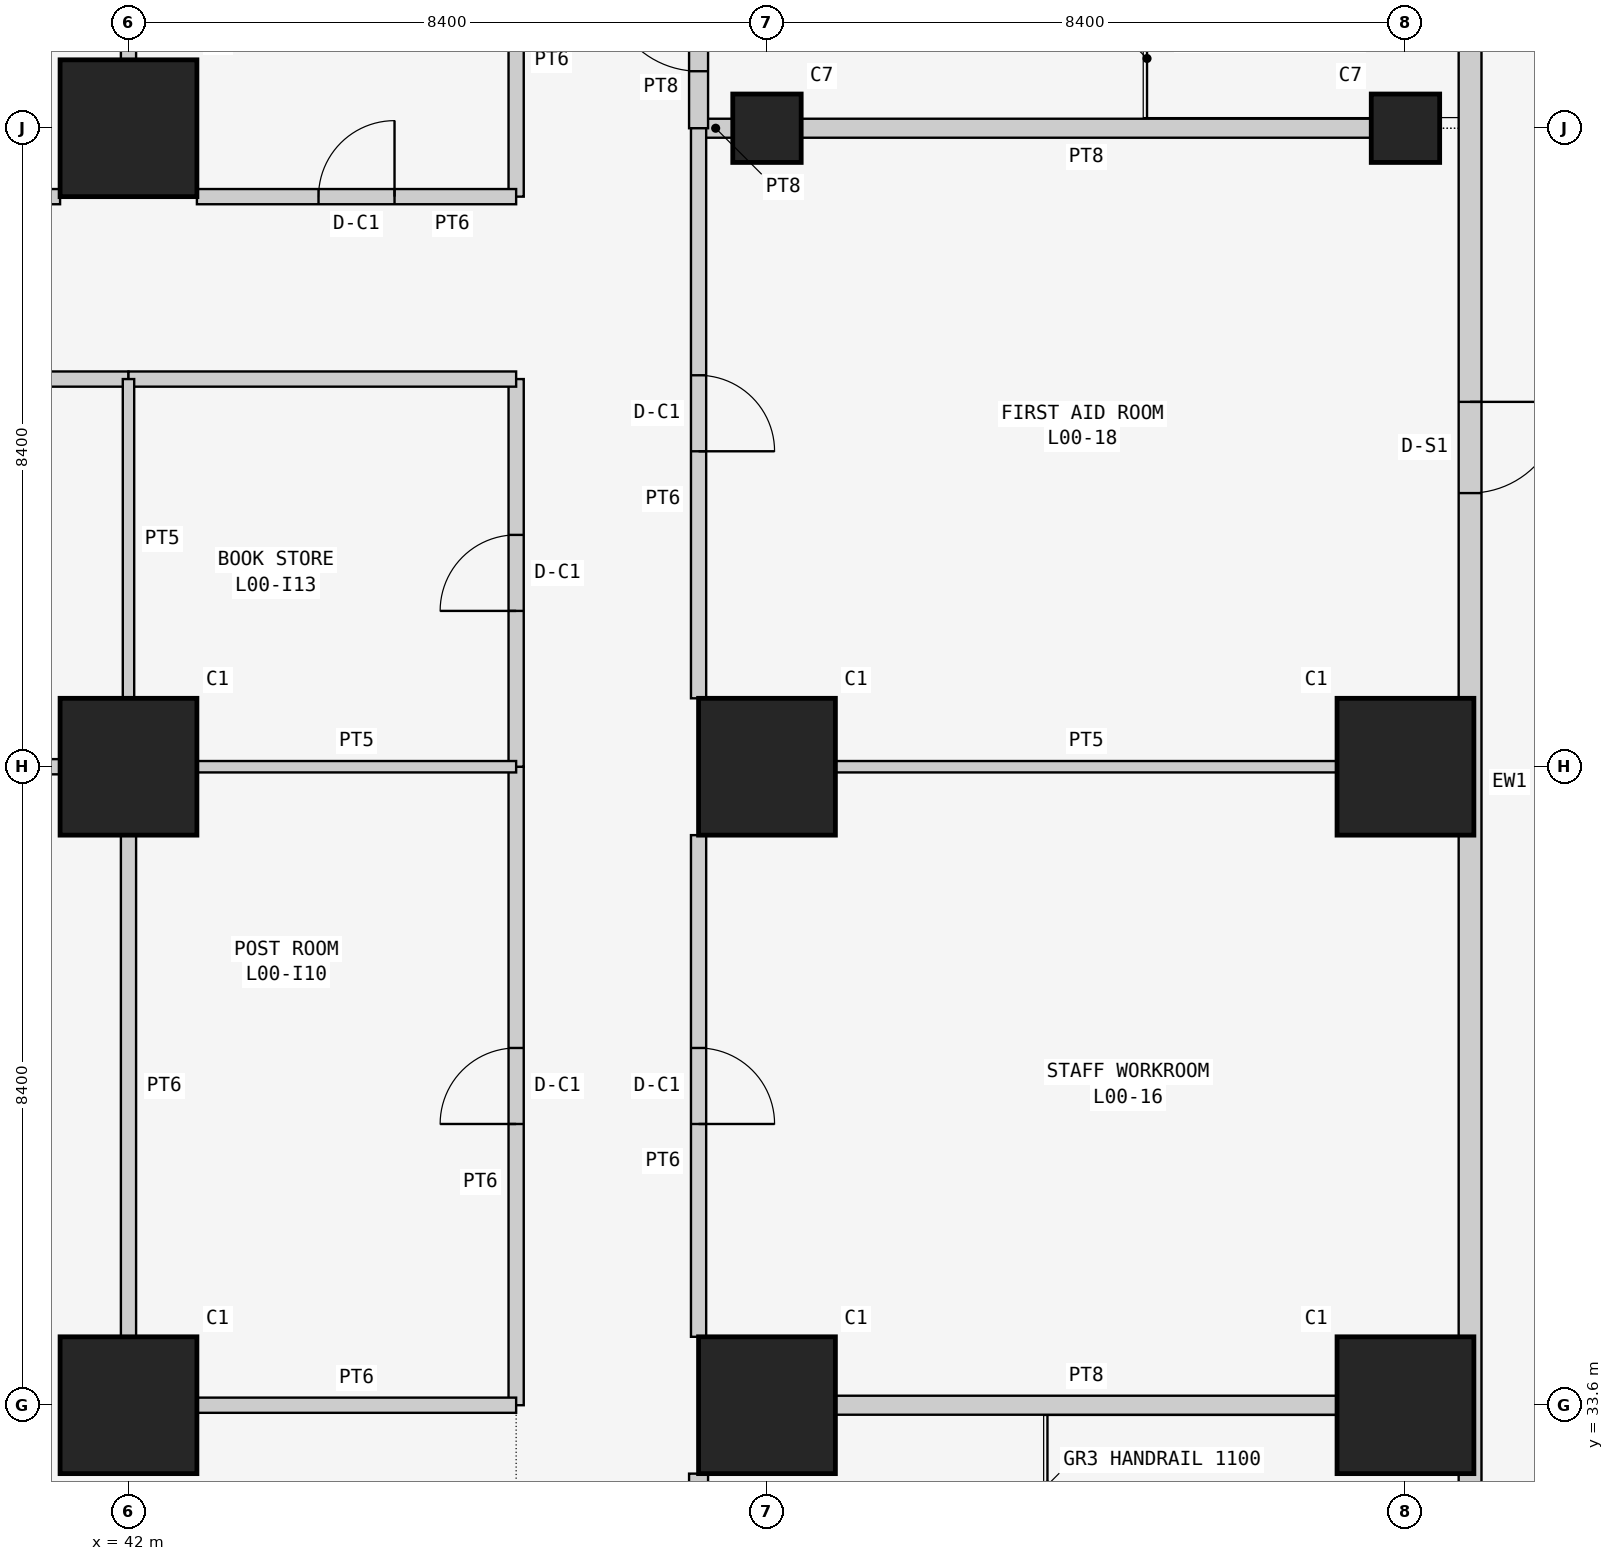
"""IFC4 building model, lengths in metres.
Left out: names, types, materials, properties, quantities, classifications, styles, units other than length and angle.
Written with IfcOpenShell. Run it as: python <this file> out.ifc"""

import sys

from ifc_helpers import new_model, si_unit, direction, frame, frame_2d, origin, origin_2d, place, context, subcontext, project, spatial, rectangle, extrude, element, fill, save


model = new_model("IFC4")
c1 = context("Model", 3, precision=1e-05, world=origin(), true_north=direction((0.0, 1.0)))
c2 = subcontext(c1, "Body", "Model", "MODEL_VIEW")
j1 = project(units=[si_unit("LENGTHUNIT", "METRE"), si_unit("PLANEANGLEUNIT", "RADIAN")], contexts=[c1])
p1 = place(None, origin())
s1 = spatial("IfcSite", under=j1, at=p1, CompositionType="ELEMENT")
p2 = place(p1, origin())
s2 = spatial("IfcBuilding", under=s1, at=p2, CompositionType="ELEMENT")
p3 = place(p2, origin())
s3 = spatial("IfcBuildingStorey", under=s2, at=p3, CompositionType="ELEMENT", Elevation=0.0)
for number, where, z_axis, x_axis in (
    (1, (42.0, 33.6, 0.0), (0.0, 0.0, 1.0), (1.0, 0.0, 0.0)),
    (2, (42.0, 42.0, 0.0), (0.0, 0.0, 1.0), (1.0, 0.0, 0.0)),
    (3, (42.0, 50.4, 0.0), (0.0, 0.0, 1.0), (1.0, 0.0, 0.0)),
    (4, (50.4, 33.6, 0.0), (0.0, 0.0, 1.0), (1.0, 0.0, 0.0)),
    (5, (50.4, 42.0, 0.0), (0.0, 0.0, 1.0), (1.0, 0.0, 0.0)),
):
    element("IfcColumn", number, at=place(p3, frame(where, z_axis=z_axis, x_axis=x_axis)), inside=s3, PredefinedType="COLUMN", context=c2, shape_type="SweptSolid", body=[
        extrude(rectangle(XDim=1.8, YDim=1.8, at=origin_2d()), origin(), (0.0, 0.0, 1.0), 6.0),
    ])
p4 = place(p3, frame((50.4, 50.4, 0.0), z_axis=(0.0, 0.0, 1.0), x_axis=(1.0, 0.0, 0.0)))
e6 = element("IfcColumn", 6, at=p4, inside=s3, PredefinedType="COLUMN", context=c2, shape_type="SweptSolid", body=[
    extrude(rectangle(XDim=0.9, YDim=0.9, at=origin_2d()), origin(), (0.0, 0.0, 1.0), 6.0),
])
for number, where, z_axis, x_axis in (
    (7, (58.8, 33.6, 0.0), (0.0, 0.0, 1.0), (1.0, 0.0, 0.0)),
    (8, (58.8, 42.0, 0.0), (0.0, 0.0, 1.0), (1.0, 0.0, 0.0)),
):
    element("IfcColumn", number, at=place(p3, frame(where, z_axis=z_axis, x_axis=x_axis)), inside=s3, PredefinedType="COLUMN", context=c2, shape_type="SweptSolid", body=[
        extrude(rectangle(XDim=1.8, YDim=1.8, at=origin_2d()), origin(), (0.0, 0.0, 1.0), 6.0),
    ])
p5 = place(p3, frame((58.8, 50.4, 0.0), z_axis=(0.0, 0.0, 1.0), x_axis=(1.0, 0.0, 0.0)))
e9 = element("IfcColumn", 9, at=p5, inside=s3, PredefinedType="COLUMN", context=c2, shape_type="SweptSolid", body=[
    extrude(rectangle(XDim=0.9, YDim=0.9, at=origin_2d()), origin(), (0.0, 0.0, 1.0), 6.0),
])
p6 = place(p3, frame((59.65, 25.2, 0.0), z_axis=(0.0, 0.0, 1.0), x_axis=(0.0, 1.0, 0.0)))
e10 = element("IfcWall", 10, at=p6, inside=s3, PredefinedType="SOLIDWALL", context=c2, shape_type="SweptSolid", body=[
    extrude(rectangle(XDim=33.2, YDim=0.3, at=frame_2d((16.6, 0.0))), origin(), (0.0, 0.0, 1.0), 5.8),
])
p7 = place(p6, frame((3.0, 0.0, 0.0)))
e11 = element("IfcOpeningElement", 11, at=p7, cuts=e10, PredefinedType="OPENING", context=c2, shape_type="SweptSolid", body=[
    extrude(rectangle(XDim=1.2, YDim=2.4, at=frame_2d((0.6, 1.2))), frame((0.0, 0.16, 0.0), z_axis=(0.0, -1.0, 0.0), x_axis=(1.0, 0.0, 0.0)), (0.0, 0.0, 1.0), 0.32),
])
p8 = place(p6, frame((20.4, 0.0, 0.0)))
e12 = element("IfcOpeningElement", 12, at=p8, cuts=e10, PredefinedType="OPENING", context=c2, shape_type="SweptSolid", body=[
    extrude(rectangle(XDim=1.2, YDim=2.4, at=frame_2d((0.6, 1.2))), frame((0.0, 0.16, 0.0), z_axis=(0.0, -1.0, 0.0), x_axis=(1.0, 0.0, 0.0)), (0.0, 0.0, 1.0), 0.32),
])
p9 = place(p6, frame((30.2, 0.0, 0.0)))
e13 = element("IfcOpeningElement", 13, at=p9, cuts=e10, PredefinedType="OPENING", context=c2, shape_type="SweptSolid", body=[
    extrude(rectangle(XDim=1.8, YDim=2.4, at=frame_2d((0.9, 1.2))), frame((0.0, 0.16, 0.0), z_axis=(0.0, -1.0, 0.0), x_axis=(1.0, 0.0, 0.0)), (0.0, 0.0, 1.0), 0.32),
])
p10 = place(p3, frame((51.3, 33.6, 0.0), z_axis=(0.0, 0.0, 1.0), x_axis=(1.0, 0.0, 0.0)))
e14 = element("IfcWall", 14, at=p10, inside=s3, PredefinedType="SOLIDWALL", context=c2, shape_type="SweptSolid", body=[
    extrude(rectangle(XDim=6.6, YDim=0.25, at=frame_2d((3.3, 0.0))), origin(), (0.0, 0.0, 1.0), 5.043),
])
p11 = place(p3, frame((49.5, 26.1, 0.0), z_axis=(0.0, 0.0, 1.0), x_axis=(0.0, 1.0, 0.0)))
e15 = element("IfcWall", 15, at=p11, inside=s3, PredefinedType="SOLIDWALL", context=c2, shape_type="SweptSolid", body=[
    extrude(rectangle(XDim=6.6, YDim=0.25, at=frame_2d((3.3, 0.0))), origin(), (0.0, 0.0, 1.0), 5.8),
])
p12 = place(p11, frame((2.0, 0.0, 0.0)))
e16 = element("IfcOpeningElement", 16, at=p12, cuts=e15, PredefinedType="OPENING", context=c2, shape_type="SweptSolid", body=[
    extrude(rectangle(XDim=2.6, YDim=2.4, at=frame_2d((1.3, 1.2))), frame((0.0, 0.135, 0.0), z_axis=(0.0, -1.0, 0.0), x_axis=(1.0, 0.0, 0.0)), (0.0, 0.0, 1.0), 0.27),
])
p13 = place(p3, frame((49.95, 50.4, 0.0), z_axis=(0.0, 0.0, 1.0), x_axis=(-1.0, 0.0, 0.0)))
e17 = element("IfcWall", 17, at=p13, inside=s3, PredefinedType="SOLIDWALL", context=c2, shape_type="SweptSolid", body=[
    extrude(rectangle(XDim=0.45, YDim=0.25, at=frame_2d((0.225, 0.0))), origin(), (0.0, 0.0, 1.0), 5.043),
])
p14 = place(p3, frame((58.35, 50.4, 0.0), z_axis=(0.0, 0.0, 1.0), x_axis=(-1.0, 0.0, 0.0)))
e18 = element("IfcWall", 18, at=p14, inside=s3, PredefinedType="SOLIDWALL", context=c2, shape_type="SweptSolid", body=[
    extrude(rectangle(XDim=7.5, YDim=0.25, at=frame_2d((3.75, 0.0))), origin(), (0.0, 0.0, 1.0), 5.043),
])
p15 = place(p3, frame((49.5, 50.4, 0.0), z_axis=(0.0, 0.0, 1.0), x_axis=(0.0, 1.0, 0.0)))
e19 = element("IfcWall", 19, at=p15, inside=s3, PredefinedType="SOLIDWALL", context=c2, shape_type="SweptSolid", body=[
    extrude(rectangle(XDim=2.7, YDim=0.25, at=frame_2d((1.35, 0.0))), origin(), (0.0, 0.0, 1.0), 5.8),
])
p16 = place(p15, frame((0.75, 0.0, 0.0)))
e20 = element("IfcOpeningElement", 20, at=p16, cuts=e19, PredefinedType="OPENING", context=c2, shape_type="SweptSolid", body=[
    extrude(rectangle(XDim=1.2, YDim=2.1, at=frame_2d((0.6, 1.05))), frame((0.0, 0.135, 0.0), z_axis=(0.0, -1.0, 0.0), x_axis=(1.0, 0.0, 0.0)), (0.0, 0.0, 1.0), 0.27),
])
p17 = place(p3, frame((51.3, 42.0, 0.0), z_axis=(0.0, 0.0, 1.0), x_axis=(1.0, 0.0, 0.0)))
e21 = element("IfcWall", 21, at=p17, inside=s3, PredefinedType="PARTITIONING", context=c2, shape_type="SweptSolid", body=[
    extrude(rectangle(XDim=6.6, YDim=0.15, at=frame_2d((3.3, 0.0))), origin(), (0.0, 0.0, 1.0), 5.043),
])
p18 = place(p3, frame((49.5, 34.5, 0.0), z_axis=(0.0, 0.0, 1.0), x_axis=(0.0, 1.0, 0.0)))
e22 = element("IfcWall", 22, at=p18, inside=s3, PredefinedType="PARTITIONING", context=c2, shape_type="SweptSolid", body=[
    extrude(rectangle(XDim=6.6, YDim=0.2, at=frame_2d((3.3, 0.0))), origin(), (0.0, 0.0, 1.0), 5.8),
])
p19 = place(p18, frame((2.8, 0.0, 0.0)))
e23 = element("IfcOpeningElement", 23, at=p19, cuts=e22, PredefinedType="OPENING", context=c2, shape_type="SweptSolid", body=[
    extrude(rectangle(XDim=1.0, YDim=2.1, at=frame_2d((0.5, 1.05))), frame((0.0, 0.11, 0.0), z_axis=(0.0, -1.0, 0.0), x_axis=(1.0, 0.0, 0.0)), (0.0, 0.0, 1.0), 0.22),
])
p20 = place(p3, frame((49.5, 42.9, 0.0), z_axis=(0.0, 0.0, 1.0), x_axis=(0.0, 1.0, 0.0)))
e24 = element("IfcWall", 24, at=p20, inside=s3, PredefinedType="PARTITIONING", context=c2, shape_type="SweptSolid", body=[
    extrude(rectangle(XDim=7.5, YDim=0.2, at=frame_2d((3.75, 0.0))), origin(), (0.0, 0.0, 1.0), 5.8),
])
p21 = place(p20, frame((3.25, 0.0, 0.0)))
e25 = element("IfcOpeningElement", 25, at=p21, cuts=e24, PredefinedType="OPENING", context=c2, shape_type="SweptSolid", body=[
    extrude(rectangle(XDim=1.0, YDim=2.1, at=frame_2d((0.5, 1.05))), frame((0.0, 0.11, 0.0), z_axis=(0.0, -1.0, 0.0), x_axis=(1.0, 0.0, 0.0)), (0.0, 0.0, 1.0), 0.22),
])
p22 = place(p3, frame((42.0, 57.9, 0.0), z_axis=(0.0, 0.0, 1.0), x_axis=(0.0, -1.0, 0.0)))
e26 = element("IfcWall", 26, at=p22, inside=s3, PredefinedType="SOLIDWALL", context=c2, shape_type="SweptSolid", body=[
    extrude(rectangle(XDim=6.6, YDim=0.2, at=frame_2d((3.3, 0.0))), origin(), (0.0, 0.0, 1.0), 5.043),
])
p23 = place(p3, frame((41.1, 49.5, 0.0), z_axis=(0.0, 0.0, 1.0), x_axis=(-1.0, 0.0, 0.0)))
e27 = element("IfcWall", 27, at=p23, inside=s3, PredefinedType="SOLIDWALL", context=c2, shape_type="SweptSolid", body=[
    extrude(rectangle(XDim=6.6, YDim=0.2, at=frame_2d((3.3, 0.0))), origin(), (0.0, 0.0, 1.0), 5.8),
])
p24 = place(p23, frame((2.8, 0.0, 0.0)))
e28 = element("IfcOpeningElement", 28, at=p24, cuts=e27, PredefinedType="OPENING", context=c2, shape_type="SweptSolid", body=[
    extrude(rectangle(XDim=1.0, YDim=2.1, at=frame_2d((0.5, 1.05))), frame((0.0, 0.11, 0.0), z_axis=(0.0, -1.0, 0.0), x_axis=(1.0, 0.0, 0.0)), (0.0, 0.0, 1.0), 0.22),
])
p25 = place(p3, frame((47.1, 53.1, 0.0), z_axis=(0.0, 0.0, 1.0), x_axis=(0.0, -1.0, 0.0)))
e29 = element("IfcWall", 29, at=p25, inside=s3, PredefinedType="PARTITIONING", context=c2, shape_type="SweptSolid", body=[
    extrude(rectangle(XDim=3.6, YDim=0.2, at=frame_2d((1.8, 0.0))), origin(), (0.0, 0.0, 1.0), 5.8),
])
p26 = place(p3, frame((47.1, 49.5, 0.0), z_axis=(0.0, 0.0, 1.0), x_axis=(-1.0, 0.0, 0.0)))
e30 = element("IfcWall", 30, at=p26, inside=s3, PredefinedType="PARTITIONING", context=c2, shape_type="SweptSolid", body=[
    extrude(rectangle(XDim=4.2, YDim=0.2, at=frame_2d((2.1, 0.0))), origin(), (0.0, 0.0, 1.0), 5.8),
])
p27 = place(p26, frame((1.6, 0.0, 0.0)))
e31 = element("IfcOpeningElement", 31, at=p27, cuts=e30, PredefinedType="OPENING", context=c2, shape_type="SweptSolid", body=[
    extrude(rectangle(XDim=1.0, YDim=2.1, at=frame_2d((0.5, 1.05))), frame((0.0, 0.11, 0.0), z_axis=(0.0, -1.0, 0.0), x_axis=(1.0, 0.0, 0.0)), (0.0, 0.0, 1.0), 0.22),
])
p28 = place(p3, frame((47.1, 33.6, 0.0), z_axis=(0.0, 0.0, 1.0), x_axis=(0.0, 1.0, 0.0)))
e32 = element("IfcWall", 32, at=p28, inside=s3, PredefinedType="PARTITIONING", context=c2, shape_type="SweptSolid", body=[
    extrude(rectangle(XDim=8.4, YDim=0.2, at=frame_2d((4.2, 0.0))), origin(), (0.0, 0.0, 1.0), 5.8),
])
p29 = place(p28, frame((3.7, 0.0, 0.0)))
e33 = element("IfcOpeningElement", 33, at=p29, cuts=e32, PredefinedType="OPENING", context=c2, shape_type="SweptSolid", body=[
    extrude(rectangle(XDim=1.0, YDim=2.1, at=frame_2d((0.5, 1.05))), frame((0.0, 0.11, 0.0), z_axis=(0.0, -1.0, 0.0), x_axis=(1.0, 0.0, 0.0)), (0.0, 0.0, 1.0), 0.22),
])
p30 = place(p3, frame((42.0, 47.1, 0.0), z_axis=(0.0, 0.0, 1.0), x_axis=(-1.0, 0.0, 0.0)))
e34 = element("IfcWall", 34, at=p30, inside=s3, PredefinedType="PARTITIONING", context=c2, shape_type="SweptSolid", body=[
    extrude(rectangle(XDim=25.2, YDim=0.2, at=frame_2d((12.6, 0.0))), origin(), (0.0, 0.0, 1.0), 5.8),
])
p31 = place(p30, frame((11.7, 0.0, 0.0)))
e35 = element("IfcOpeningElement", 35, at=p31, cuts=e34, PredefinedType="OPENING", context=c2, shape_type="SweptSolid", body=[
    extrude(rectangle(XDim=1.8, YDim=2.4, at=frame_2d((0.9, 1.2))), frame((0.0, 0.11, 0.0), z_axis=(0.0, -1.0, 0.0), x_axis=(1.0, 0.0, 0.0)), (0.0, 0.0, 1.0), 0.22),
])
p32 = place(p3, frame((47.1, 42.0, 0.0), z_axis=(0.0, 0.0, 1.0), x_axis=(0.0, 1.0, 0.0)))
e36 = element("IfcWall", 36, at=p32, inside=s3, PredefinedType="PARTITIONING", context=c2, shape_type="SweptSolid", body=[
    extrude(rectangle(XDim=5.1, YDim=0.2, at=frame_2d((2.55, 0.0))), origin(), (0.0, 0.0, 1.0), 5.8),
])
p33 = place(p32, frame((2.05, 0.0, 0.0)))
e37 = element("IfcOpeningElement", 37, at=p33, cuts=e36, PredefinedType="OPENING", context=c2, shape_type="SweptSolid", body=[
    extrude(rectangle(XDim=1.0, YDim=2.1, at=frame_2d((0.5, 1.05))), frame((0.0, 0.11, 0.0), z_axis=(0.0, -1.0, 0.0), x_axis=(1.0, 0.0, 0.0)), (0.0, 0.0, 1.0), 0.22),
])
p34 = place(p3, frame((47.1, 47.1, 0.0), z_axis=(0.0, 0.0, 1.0), x_axis=(-1.0, 0.0, 0.0)))
e38 = element("IfcWall", 38, at=p34, inside=s3, PredefinedType="PARTITIONING", context=c2, shape_type="SweptSolid", body=[
    extrude(rectangle(XDim=5.1, YDim=0.2, at=frame_2d((2.55, 0.0))), origin(), (0.0, 0.0, 1.0), 5.8),
])
p35 = place(p3, frame((42.0, 41.1, 0.0), z_axis=(0.0, 0.0, 1.0), x_axis=(0.0, -1.0, 0.0)))
e39 = element("IfcWall", 39, at=p35, inside=s3, PredefinedType="PARTITIONING", context=c2, shape_type="SweptSolid", body=[
    extrude(rectangle(XDim=6.6, YDim=0.2, at=frame_2d((3.3, 0.0))), origin(), (0.0, 0.0, 1.0), 5.043),
])
p36 = place(p3, frame((42.9, 33.6, 0.0), z_axis=(0.0, 0.0, 1.0), x_axis=(1.0, 0.0, 0.0)))
e40 = element("IfcWall", 40, at=p36, inside=s3, PredefinedType="PARTITIONING", context=c2, shape_type="SweptSolid", body=[
    extrude(rectangle(XDim=4.2, YDim=0.2, at=frame_2d((2.1, 0.0))), origin(), (0.0, 0.0, 1.0), 5.043),
])
p37 = place(p3, frame((34.5, 42.0, 0.0), z_axis=(0.0, 0.0, 1.0), x_axis=(1.0, 0.0, 0.0)))
e41 = element("IfcWall", 41, at=p37, inside=s3, PredefinedType="PARTITIONING", context=c2, shape_type="SweptSolid", body=[
    extrude(rectangle(XDim=6.6, YDim=0.2, at=frame_2d((3.3, 0.0))), origin(), (0.0, 0.0, 1.0), 5.043),
])
for number, where, z_axis, x_axis in (
    (42, (42.9, 42.0, 0.0), (0.0, 0.0, 1.0), (1.0, 0.0, 0.0)),
    (43, (42.0, 47.1, 0.0), (0.0, 0.0, 1.0), (0.0, -1.0, 0.0)),
):
    element("IfcWall", number, at=place(p3, frame(where, z_axis=z_axis, x_axis=x_axis)), inside=s3, PredefinedType="PARTITIONING", context=c2, shape_type="SweptSolid", body=[
        extrude(rectangle(XDim=4.2, YDim=0.15, at=frame_2d((2.1, 0.0))), origin(), (0.0, 0.0, 1.0), 5.043),
    ])
p38 = place(p8, frame((1.2, 0.0, 0.0), z_axis=(0.0, 0.0, 1.0), x_axis=(-1.0, 0.0, 0.0)))
e44 = element("IfcDoor", 44, at=p38, inside=s3, OperationType="SINGLE_SWING_LEFT", PredefinedType="DOOR", context=c2, shape_type="SweptSolid", body=[
    extrude(rectangle(XDim=1.2, YDim=2.4, at=frame_2d((0.6, 1.2))), frame((0.0, 0.025, 0.0), z_axis=(0.0, -1.0, 0.0), x_axis=(1.0, 0.0, 0.0)), (0.0, 0.0, 1.0), 0.05),
])
fill(e12, e44)
p39 = place(p16, origin())
e45 = element("IfcDoor", 45, at=p39, inside=s3, OperationType="SINGLE_SWING_RIGHT", PredefinedType="DOOR", context=c2, shape_type="SweptSolid", body=[
    extrude(rectangle(XDim=1.2, YDim=2.1, at=frame_2d((0.6, 1.05))), frame((0.0, 0.025, 0.0), z_axis=(0.0, -1.0, 0.0), x_axis=(1.0, 0.0, 0.0)), (0.0, 0.0, 1.0), 0.05),
])
fill(e20, e45)
p40 = place(p19, frame((1.0, 0.0, 0.0), z_axis=(0.0, 0.0, 1.0), x_axis=(-1.0, 0.0, 0.0)))
e46 = element("IfcDoor", 46, at=p40, inside=s3, OperationType="SINGLE_SWING_RIGHT", PredefinedType="DOOR", context=c2, shape_type="SweptSolid", body=[
    extrude(rectangle(XDim=1.0, YDim=2.1, at=frame_2d((0.5, 1.05))), frame((0.0, 0.025, 0.0), z_axis=(0.0, -1.0, 0.0), x_axis=(1.0, 0.0, 0.0)), (0.0, 0.0, 1.0), 0.05),
])
fill(e23, e46)
p41 = place(p21, frame((1.0, 0.0, 0.0), z_axis=(0.0, 0.0, 1.0), x_axis=(-1.0, 0.0, 0.0)))
e47 = element("IfcDoor", 47, at=p41, inside=s3, OperationType="SINGLE_SWING_RIGHT", PredefinedType="DOOR", context=c2, shape_type="SweptSolid", body=[
    extrude(rectangle(XDim=1.0, YDim=2.1, at=frame_2d((0.5, 1.05))), frame((0.0, 0.025, 0.0), z_axis=(0.0, -1.0, 0.0), x_axis=(1.0, 0.0, 0.0)), (0.0, 0.0, 1.0), 0.05),
])
fill(e25, e47)
p42 = place(p27, frame((1.0, 0.0, 0.0), z_axis=(0.0, 0.0, 1.0), x_axis=(-1.0, 0.0, 0.0)))
e48 = element("IfcDoor", 48, at=p42, inside=s3, OperationType="SINGLE_SWING_RIGHT", PredefinedType="DOOR", context=c2, shape_type="SweptSolid", body=[
    extrude(rectangle(XDim=1.0, YDim=2.1, at=frame_2d((0.5, 1.05))), frame((0.0, 0.025, 0.0), z_axis=(0.0, -1.0, 0.0), x_axis=(1.0, 0.0, 0.0)), (0.0, 0.0, 1.0), 0.05),
])
fill(e31, e48)
p43 = place(p29, origin())
e49 = element("IfcDoor", 49, at=p43, inside=s3, OperationType="SINGLE_SWING_LEFT", PredefinedType="DOOR", context=c2, shape_type="SweptSolid", body=[
    extrude(rectangle(XDim=1.0, YDim=2.1, at=frame_2d((0.5, 1.05))), frame((0.0, 0.025, 0.0), z_axis=(0.0, -1.0, 0.0), x_axis=(1.0, 0.0, 0.0)), (0.0, 0.0, 1.0), 0.05),
])
fill(e33, e49)
p44 = place(p33, origin())
e50 = element("IfcDoor", 50, at=p44, inside=s3, OperationType="SINGLE_SWING_LEFT", PredefinedType="DOOR", context=c2, shape_type="SweptSolid", body=[
    extrude(rectangle(XDim=1.0, YDim=2.1, at=frame_2d((0.5, 1.05))), frame((0.0, 0.025, 0.0), z_axis=(0.0, -1.0, 0.0), x_axis=(1.0, 0.0, 0.0)), (0.0, 0.0, 1.0), 0.05),
])
fill(e37, e50)
save(model, sys.argv[1])
